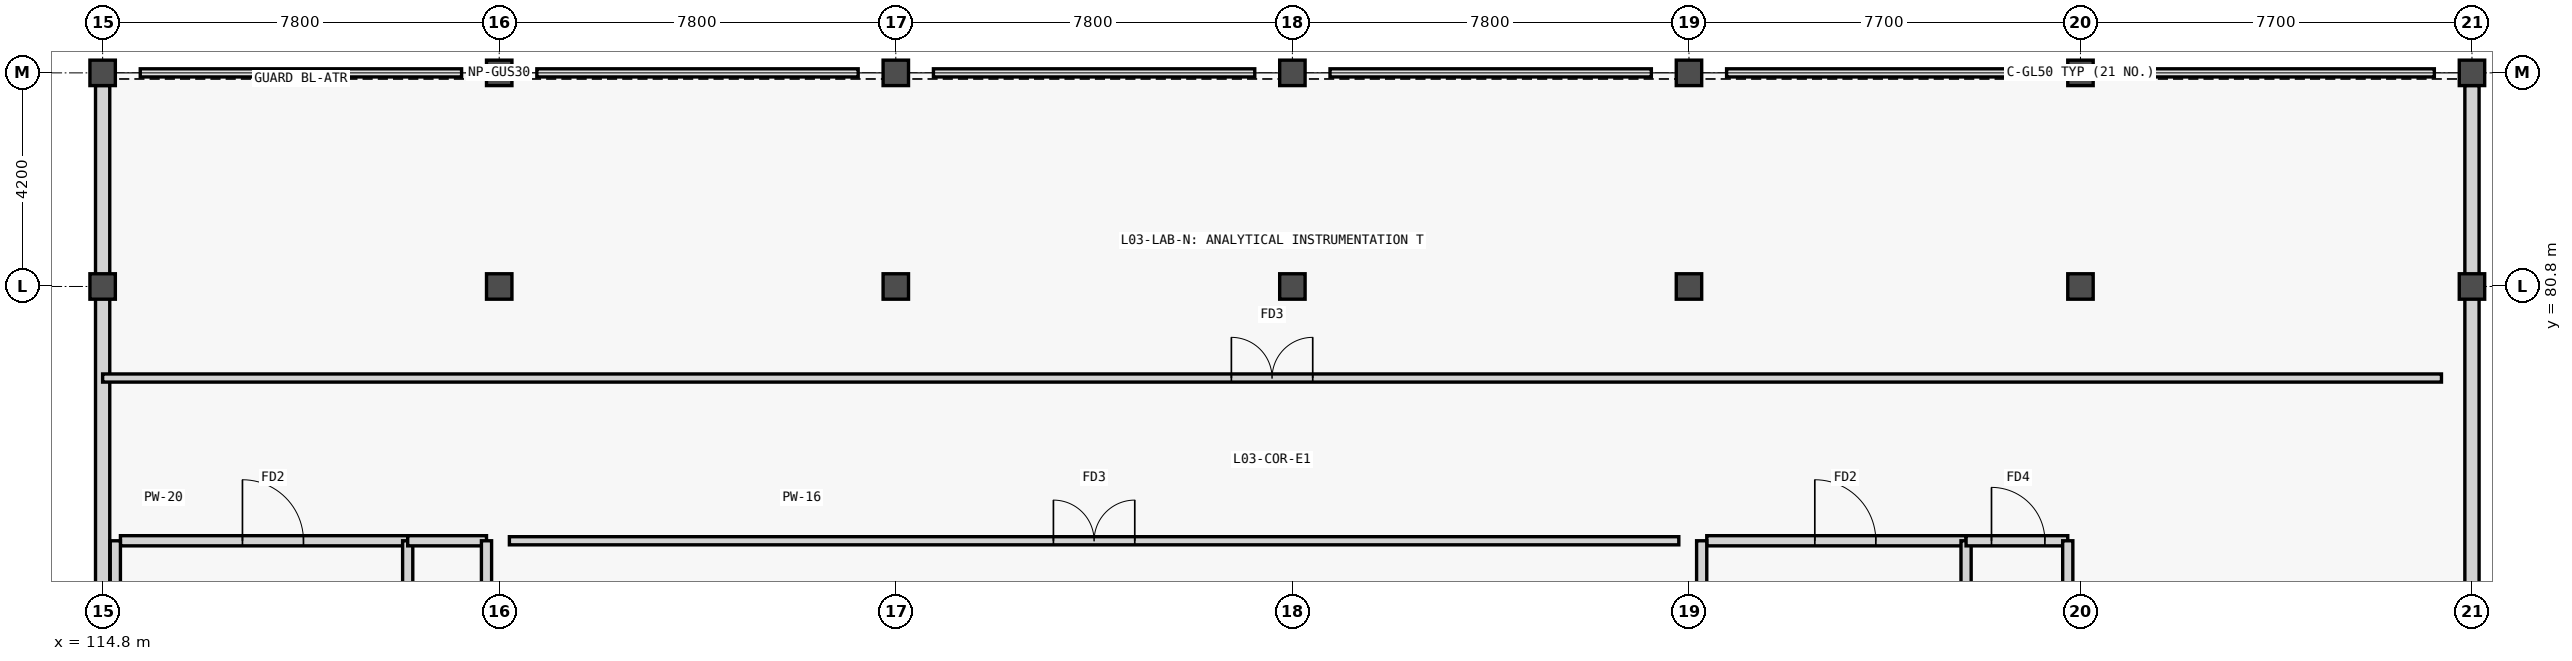
"""IFC4 building model, lengths in metres.
Left out: names, types, materials, properties, quantities, classifications, styles, units other than length and angle.
Written with IfcOpenShell. Run it as: python <this file> out.ifc"""

import sys

from ifc_helpers import new_model, si_unit, direction, frame, frame_2d, origin, origin_2d, place, context, subcontext, project, spatial, rectangle, extrude, element, fill, save


model = new_model("IFC4")
c1 = context("Model", 3, precision=1e-05, world=origin(), true_north=direction((0.0, 1.0)))
c2 = subcontext(c1, "Body", "Model", "MODEL_VIEW")
j1 = project(units=[si_unit("LENGTHUNIT", "METRE"), si_unit("PLANEANGLEUNIT", "RADIAN")], contexts=[c1])
p1 = place(None, origin())
s1 = spatial("IfcSite", under=j1, at=p1, CompositionType="ELEMENT")
p2 = place(p1, origin())
s2 = spatial("IfcBuilding", under=s1, at=p2, CompositionType="ELEMENT")
p3 = place(p2, frame((0.0, 0.0, 14.4)))
s3 = spatial("IfcBuildingStorey", under=s2, at=p3, CompositionType="ELEMENT", Elevation=14.4)
for number, where, z_axis, x_axis in (
    (1, (114.8, 80.8, 0.0), (0.0, 0.0, 1.0), (1.0, 0.0, 0.0)),
    (2, (114.8, 85.0, 0.0), (0.0, 0.0, 1.0), (1.0, 0.0, 0.0)),
    (3, (122.6, 80.8, 0.0), (0.0, 0.0, 1.0), (1.0, 0.0, 0.0)),
    (4, (122.6, 85.0, 0.0), (0.0, 0.0, 1.0), (1.0, 0.0, 0.0)),
    (5, (130.4, 80.8, 0.0), (0.0, 0.0, 1.0), (1.0, 0.0, 0.0)),
    (6, (130.4, 85.0, 0.0), (0.0, 0.0, 1.0), (1.0, 0.0, 0.0)),
    (7, (138.2, 80.8, 0.0), (0.0, 0.0, 1.0), (1.0, 0.0, 0.0)),
    (8, (138.2, 85.0, 0.0), (0.0, 0.0, 1.0), (1.0, 0.0, 0.0)),
    (9, (146.0, 80.8, 0.0), (0.0, 0.0, 1.0), (1.0, 0.0, 0.0)),
    (10, (146.0, 85.0, 0.0), (0.0, 0.0, 1.0), (1.0, 0.0, 0.0)),
    (11, (153.7, 80.8, 0.0), (0.0, 0.0, 1.0), (1.0, 0.0, 0.0)),
    (12, (153.7, 85.0, 0.0), (0.0, 0.0, 1.0), (1.0, 0.0, 0.0)),
    (13, (161.4, 80.8, 0.0), (0.0, 0.0, 1.0), (1.0, 0.0, 0.0)),
    (14, (161.4, 85.0, 0.0), (0.0, 0.0, 1.0), (1.0, 0.0, 0.0)),
):
    element("IfcColumn", number, at=place(p3, frame(where, z_axis=z_axis, x_axis=x_axis)), inside=s3, PredefinedType="COLUMN", context=c2, shape_type="SweptSolid", body=[
        extrude(rectangle(XDim=0.5, YDim=0.5, at=origin_2d()), origin(), (0.0, 0.0, 1.0), 3.6),
    ])
p4 = place(p3, frame((161.4, 84.752, 0.0), z_axis=(0.0, 0.0, 1.0), x_axis=(0.0, -1.0, 0.0)))
e15 = element("IfcWall", 15, at=p4, inside=s3, PredefinedType="SOLIDWALL", context=c2, shape_type="SweptSolid", body=[
    extrude(rectangle(XDim=20.504, YDim=0.28, at=frame_2d((10.252, 0.0))), origin(), (0.0, 0.0, 1.0), 2.76),
])
p5 = place(p4, frame((14.602, 0.0, 0.9)))
e16 = element("IfcOpeningElement", 16, at=p5, cuts=e15, PredefinedType="OPENING", context=c2, shape_type="SweptSolid", body=[
    extrude(rectangle(XDim=2.7, YDim=1.7, at=frame_2d((1.35, 0.85))), frame((0.0, 0.15, 0.0), z_axis=(0.0, -1.0, 0.0), x_axis=(1.0, 0.0, 0.0)), (0.0, 0.0, 1.0), 0.3),
])
p6 = place(p3, frame((114.8, 72.6, 0.0), z_axis=(0.0, 0.0, 1.0), x_axis=(0.0, 1.0, 0.0)))
e17 = element("IfcWall", 17, at=p6, inside=s3, PredefinedType="SOLIDWALL", context=c2, shape_type="SweptSolid", body=[
    extrude(rectangle(XDim=12.152, YDim=0.28, at=frame_2d((6.076, 0.0))), origin(), (0.0, 0.0, 1.0), 2.76),
])
p7 = place(p3, frame((115.15, 75.8, 0.0), z_axis=(0.0, 0.0, 1.0), x_axis=(1.0, 0.0, 0.0)))
e18 = element("IfcWall", 18, at=p7, inside=s3, PredefinedType="PARTITIONING", context=c2, shape_type="SweptSolid", body=[
    extrude(rectangle(XDim=5.65, YDim=0.2, at=frame_2d((2.825, 0.0))), origin(), (0.0, 0.0, 1.0), 3.32),
])
p8 = place(p7, frame((2.4, 0.0, 0.0)))
e19 = element("IfcOpeningElement", 19, at=p8, cuts=e18, PredefinedType="OPENING", context=c2, shape_type="SweptSolid", body=[
    extrude(rectangle(XDim=1.2, YDim=2.2, at=frame_2d((0.6, 1.1))), frame((0.0, 0.11, 0.0), z_axis=(0.0, -1.0, 0.0), x_axis=(1.0, 0.0, 0.0)), (0.0, 0.0, 1.0), 0.22),
])
p9 = place(p3, frame((115.05, 72.4, 0.0), z_axis=(0.0, 0.0, 1.0), x_axis=(0.0, 1.0, 0.0)))
e20 = element("IfcWall", 20, at=p9, inside=s3, PredefinedType="PARTITIONING", context=c2, shape_type="SweptSolid", body=[
    extrude(rectangle(XDim=3.4, YDim=0.2, at=frame_2d((1.7, 0.0))), origin(), (0.0, 0.0, 1.0), 2.76),
])
p10 = place(p3, frame((120.8, 72.4, 0.0), z_axis=(0.0, 0.0, 1.0), x_axis=(0.0, 1.0, 0.0)))
e21 = element("IfcWall", 21, at=p10, inside=s3, PredefinedType="PARTITIONING", context=c2, shape_type="SweptSolid", body=[
    extrude(rectangle(XDim=3.4, YDim=0.2, at=frame_2d((1.7, 0.0))), origin(), (0.0, 0.0, 1.0), 3.32),
])
p11 = place(p10, frame((1.1, 0.0, 0.0)))
e22 = element("IfcOpeningElement", 22, at=p11, cuts=e21, PredefinedType="OPENING", context=c2, shape_type="SweptSolid", body=[
    extrude(rectangle(XDim=1.2, YDim=2.2, at=frame_2d((0.6, 1.1))), frame((0.0, 0.11, 0.0), z_axis=(0.0, -1.0, 0.0), x_axis=(1.0, 0.0, 0.0)), (0.0, 0.0, 1.0), 0.22),
])
p12 = place(p3, frame((120.8, 75.8, 0.0), z_axis=(0.0, 0.0, 1.0), x_axis=(1.0, 0.0, 0.0)))
e23 = element("IfcWall", 23, at=p12, inside=s3, PredefinedType="PARTITIONING", context=c2, shape_type="SweptSolid", body=[
    extrude(rectangle(XDim=1.55, YDim=0.2, at=frame_2d((0.775, 0.0))), origin(), (0.0, 0.0, 1.0), 3.32),
])
p13 = place(p3, frame((122.35, 72.4, 0.0), z_axis=(0.0, 0.0, 1.0), x_axis=(0.0, 1.0, 0.0)))
e24 = element("IfcWall", 24, at=p13, inside=s3, PredefinedType="PARTITIONING", context=c2, shape_type="SweptSolid", body=[
    extrude(rectangle(XDim=3.4, YDim=0.2, at=frame_2d((1.7, 0.0))), origin(), (0.0, 0.0, 1.0), 2.76),
])
p14 = place(p3, frame((146.35, 75.8, 0.0), z_axis=(0.0, 0.0, 1.0), x_axis=(1.0, 0.0, 0.0)))
e25 = element("IfcWall", 25, at=p14, inside=s3, PredefinedType="PARTITIONING", context=c2, shape_type="SweptSolid", body=[
    extrude(rectangle(XDim=5.1, YDim=0.2, at=frame_2d((2.55, 0.0))), origin(), (0.0, 0.0, 1.0), 3.32),
])
p15 = place(p14, frame((2.125, 0.0, 0.0)))
e26 = element("IfcOpeningElement", 26, at=p15, cuts=e25, PredefinedType="OPENING", context=c2, shape_type="SweptSolid", body=[
    extrude(rectangle(XDim=1.2, YDim=2.2, at=frame_2d((0.6, 1.1))), frame((0.0, 0.11, 0.0), z_axis=(0.0, -1.0, 0.0), x_axis=(1.0, 0.0, 0.0)), (0.0, 0.0, 1.0), 0.22),
])
p16 = place(p3, frame((146.25, 72.4, 0.0), z_axis=(0.0, 0.0, 1.0), x_axis=(0.0, 1.0, 0.0)))
e27 = element("IfcWall", 27, at=p16, inside=s3, PredefinedType="PARTITIONING", context=c2, shape_type="SweptSolid", body=[
    extrude(rectangle(XDim=3.4, YDim=0.2, at=frame_2d((1.7, 0.0))), origin(), (0.0, 0.0, 1.0), 2.76),
])
p17 = place(p3, frame((151.45, 72.4, 0.0), z_axis=(0.0, 0.0, 1.0), x_axis=(0.0, 1.0, 0.0)))
e28 = element("IfcWall", 28, at=p17, inside=s3, PredefinedType="PARTITIONING", context=c2, shape_type="SweptSolid", body=[
    extrude(rectangle(XDim=3.4, YDim=0.2, at=frame_2d((1.7, 0.0))), origin(), (0.0, 0.0, 1.0), 3.32),
])
p18 = place(p17, frame((1.1, 0.0, 0.0)))
e29 = element("IfcOpeningElement", 29, at=p18, cuts=e28, PredefinedType="OPENING", context=c2, shape_type="SweptSolid", body=[
    extrude(rectangle(XDim=1.2, YDim=2.2, at=frame_2d((0.6, 1.1))), frame((0.0, 0.11, 0.0), z_axis=(0.0, -1.0, 0.0), x_axis=(1.0, 0.0, 0.0)), (0.0, 0.0, 1.0), 0.22),
])
p19 = place(p3, frame((151.45, 75.8, 0.0), z_axis=(0.0, 0.0, 1.0), x_axis=(1.0, 0.0, 0.0)))
e30 = element("IfcWall", 30, at=p19, inside=s3, PredefinedType="PARTITIONING", context=c2, shape_type="SweptSolid", body=[
    extrude(rectangle(XDim=2.0, YDim=0.2, at=frame_2d((1.0, 0.0))), origin(), (0.0, 0.0, 1.0), 3.32),
])
p20 = place(p19, frame((0.5, 0.0, 0.0)))
e31 = element("IfcOpeningElement", 31, at=p20, cuts=e30, PredefinedType="OPENING", context=c2, shape_type="SweptSolid", body=[
    extrude(rectangle(XDim=1.05, YDim=2.15, at=frame_2d((0.525, 1.075))), frame((0.0, 0.11, 0.0), z_axis=(0.0, -1.0, 0.0), x_axis=(1.0, 0.0, 0.0)), (0.0, 0.0, 1.0), 0.22),
])
p21 = place(p3, frame((153.45, 72.4, 0.0), z_axis=(0.0, 0.0, 1.0), x_axis=(0.0, 1.0, 0.0)))
e32 = element("IfcWall", 32, at=p21, inside=s3, PredefinedType="PARTITIONING", context=c2, shape_type="SweptSolid", body=[
    extrude(rectangle(XDim=3.4, YDim=0.2, at=frame_2d((1.7, 0.0))), origin(), (0.0, 0.0, 1.0), 2.76),
])
p22 = place(p3, frame((122.8, 75.8, 0.0), z_axis=(0.0, 0.0, 1.0), x_axis=(1.0, 0.0, 0.0)))
e33 = element("IfcWall", 33, at=p22, inside=s3, PredefinedType="PARTITIONING", context=c2, shape_type="SweptSolid", body=[
    extrude(rectangle(XDim=23.0, YDim=0.16, at=frame_2d((11.5, 0.0))), origin(), (0.0, 0.0, 1.0), 3.34),
])
p23 = place(p22, frame((10.7, 0.0, 0.0)))
e34 = element("IfcOpeningElement", 34, at=p23, cuts=e33, PredefinedType="OPENING", context=c2, shape_type="SweptSolid", body=[
    extrude(rectangle(XDim=1.6, YDim=2.2, at=frame_2d((0.8, 1.1))), frame((0.0, 0.09, 0.0), z_axis=(0.0, -1.0, 0.0), x_axis=(1.0, 0.0, 0.0)), (0.0, 0.0, 1.0), 0.18),
])
p24 = place(p3, frame((114.8, 79.0, 0.0), z_axis=(0.0, 0.0, 1.0), x_axis=(1.0, 0.0, 0.0)))
e35 = element("IfcWall", 35, at=p24, inside=s3, PredefinedType="PARTITIONING", context=c2, shape_type="SweptSolid", body=[
    extrude(rectangle(XDim=46.0, YDim=0.16, at=frame_2d((23.0, 0.0))), origin(), (0.0, 0.0, 1.0), 3.34),
])
p25 = place(p24, frame((22.2, 0.0, 0.0)))
e36 = element("IfcOpeningElement", 36, at=p25, cuts=e35, PredefinedType="OPENING", context=c2, shape_type="SweptSolid", body=[
    extrude(rectangle(XDim=1.6, YDim=2.2, at=frame_2d((0.8, 1.1))), frame((0.0, 0.09, 0.0), z_axis=(0.0, -1.0, 0.0), x_axis=(1.0, 0.0, 0.0)), (0.0, 0.0, 1.0), 0.18),
])
p26 = place(p8, origin())
e37 = element("IfcDoor", 37, at=p26, inside=s3, OperationType="SINGLE_SWING_LEFT", PredefinedType="DOOR", context=c2, shape_type="SweptSolid", body=[
    extrude(rectangle(XDim=1.2, YDim=2.2, at=frame_2d((0.6, 1.1))), frame((0.0, 0.025, 0.0), z_axis=(0.0, -1.0, 0.0), x_axis=(1.0, 0.0, 0.0)), (0.0, 0.0, 1.0), 0.05),
])
fill(e19, e37)
p27 = place(p15, origin())
e38 = element("IfcDoor", 38, at=p27, inside=s3, OperationType="SINGLE_SWING_LEFT", PredefinedType="DOOR", context=c2, shape_type="SweptSolid", body=[
    extrude(rectangle(XDim=1.2, YDim=2.2, at=frame_2d((0.6, 1.1))), frame((0.0, 0.025, 0.0), z_axis=(0.0, -1.0, 0.0), x_axis=(1.0, 0.0, 0.0)), (0.0, 0.0, 1.0), 0.05),
])
fill(e26, e38)
p28 = place(p20, origin())
e39 = element("IfcDoor", 39, at=p28, inside=s3, OperationType="SINGLE_SWING_LEFT", PredefinedType="DOOR", context=c2, shape_type="SweptSolid", body=[
    extrude(rectangle(XDim=1.05, YDim=2.15, at=frame_2d((0.525, 1.075))), frame((0.0, 0.025, 0.0), z_axis=(0.0, -1.0, 0.0), x_axis=(1.0, 0.0, 0.0)), (0.0, 0.0, 1.0), 0.05),
])
fill(e31, e39)
p29 = place(p23, origin())
e40 = element("IfcDoor", 40, at=p29, inside=s3, OperationType="DOUBLE_DOOR_SINGLE_SWING", PredefinedType="DOOR", context=c2, shape_type="SweptSolid", body=[
    extrude(rectangle(XDim=1.6, YDim=2.2, at=frame_2d((0.8, 1.1))), frame((0.0, 0.025, 0.0), z_axis=(0.0, -1.0, 0.0), x_axis=(1.0, 0.0, 0.0)), (0.0, 0.0, 1.0), 0.05),
])
fill(e34, e40)
p30 = place(p25, origin())
e41 = element("IfcDoor", 41, at=p30, inside=s3, OperationType="DOUBLE_DOOR_SINGLE_SWING", PredefinedType="DOOR", context=c2, shape_type="SweptSolid", body=[
    extrude(rectangle(XDim=1.6, YDim=2.2, at=frame_2d((0.8, 1.1))), frame((0.0, 0.025, 0.0), z_axis=(0.0, -1.0, 0.0), x_axis=(1.0, 0.0, 0.0)), (0.0, 0.0, 1.0), 0.05),
])
fill(e36, e41)
save(model, sys.argv[1])
